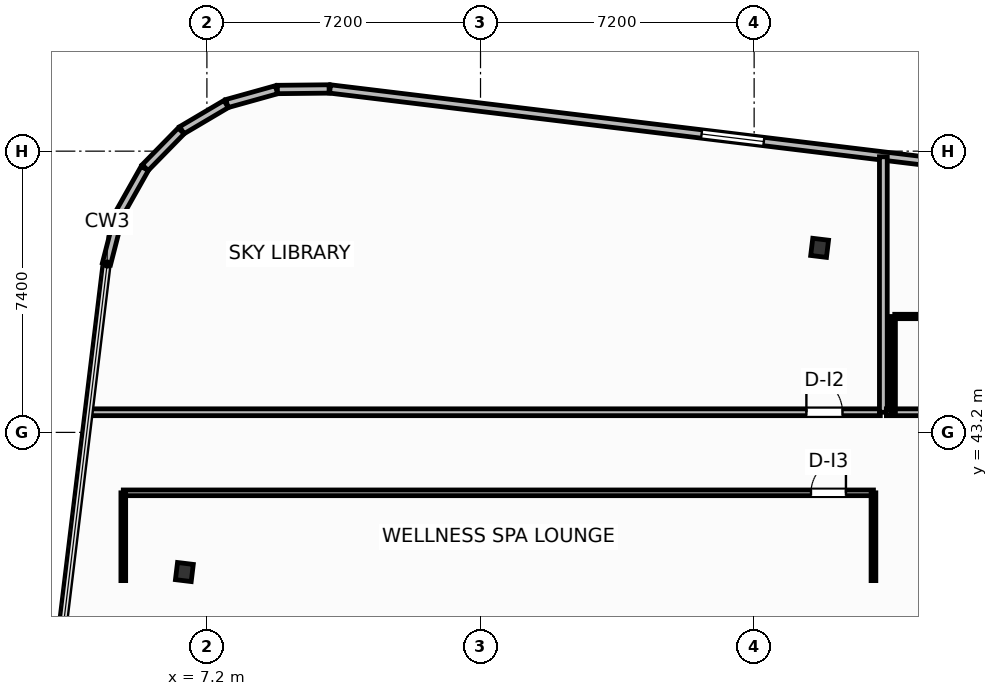
"""IFC4 building model, lengths in metres.
Left out: names, types, materials, properties, quantities, classifications, styles, units other than length and angle.
Written with IfcOpenShell. Run it as: python <this file> out.ifc"""

import sys

from ifc_helpers import new_model, si_unit, direction, frame, frame_2d, origin, origin_2d, place, context, subcontext, project, spatial, rectangle, i_section, extrude, element, fill, save


model = new_model("IFC4")
c1 = context("Model", 3, precision=1e-05, world=origin(), true_north=direction((0.0, 1.0)))
c2 = subcontext(c1, "Body", "Model", "MODEL_VIEW")
j1 = project(units=[si_unit("LENGTHUNIT", "METRE"), si_unit("PLANEANGLEUNIT", "RADIAN")], contexts=[c1])
p1 = place(None, origin())
s1 = spatial("IfcSite", under=j1, at=p1, CompositionType="ELEMENT")
p2 = place(p1, origin())
s2 = spatial("IfcBuilding", under=s1, at=p2, CompositionType="ELEMENT")
p3 = place(p2, frame((0.0, 0.0, 151.3)))
s3 = spatial("IfcBuildingStorey", under=s2, at=p3, CompositionType="ELEMENT", Elevation=151.3)
for number, where, z_axis, x_axis in (
    (1, (23.323, 48.056, 0.0), (0.0, 0.0, 1.0), (0.993, -0.12, 0.0)),
    (2, (6.607, 39.526, 0.0), (0.0, 0.0, 1.0), (0.993, -0.12, 0.0)),
):
    element("IfcColumn", number, at=place(p3, frame(where, z_axis=z_axis, x_axis=x_axis)), inside=s3, PredefinedType="COLUMN", context=c2, shape_type="SweptSolid", body=[
        extrude(i_section(OverallWidth=0.418, OverallDepth=0.455, WebThickness=0.042, FlangeThickness=0.068, FilletRadius=0.025, at=origin_2d()), origin(), (0.0, 0.0, 1.0), 3.7),
    ])
p4 = place(p3, frame((31.633, 49.668, 0.0), z_axis=(0.0, 0.0, 1.0), x_axis=(-0.992731670483, 0.120348786531, 0.0)))
e3 = element("IfcWall", 3, at=p4, inside=s3, PredefinedType="SOLIDWALL", context=c2, shape_type="SweptSolid", body=[
    extrude(rectangle(XDim=21.347, YDim=0.22, at=frame_2d((10.674, 0.0))), origin(), (0.0, 0.0, 1.0), 2.73),
])
p5 = place(p4, frame((9.849, 0.0, 0.8)))
e4 = element("IfcOpeningElement", 4, at=p5, cuts=e3, PredefinedType="OPENING", context=c2, shape_type="SweptSolid", body=[
    extrude(rectangle(XDim=1.65, YDim=1.65, at=frame_2d((0.825, 0.825))), frame((0.0, 0.12, 0.0), z_axis=(0.0, -1.0, 0.0), x_axis=(1.0, 0.0, 0.0)), (0.0, 0.0, 1.0), 0.24),
])
p6 = place(p3, frame((10.416, 52.237, 0.0), z_axis=(0.0, 0.0, 1.0), x_axis=(-0.999947718056, -0.010225514878, 0.0)))
e5 = element("IfcWall", 5, at=p6, inside=s3, PredefinedType="SOLIDWALL", context=c2, shape_type="SweptSolid", body=[
    extrude(rectangle(XDim=1.361, YDim=0.22, at=frame_2d((0.68, 0.0))), origin(), (0.0, 0.0, 1.0), 2.73),
])
for number, where, z_axis, x_axis in (
    (6, (9.031, 52.216, 0.0), (0.0, 0.0, 1.0), (-0.963, -0.269, 0.0)),
    (7, (7.706, 51.84, 0.0), (0.0, 0.0, 1.0), (-0.861, -0.509, 0.0)),
):
    element("IfcWall", number, at=place(p3, frame(where, z_axis=z_axis, x_axis=x_axis)), inside=s3, PredefinedType="SOLIDWALL", context=c2, shape_type="SweptSolid", body=[
        extrude(rectangle(XDim=1.353, YDim=0.22, at=frame_2d((0.677, 0.0))), origin(), (0.0, 0.0, 1.0), 2.73),
    ])
p7 = place(p3, frame((6.523, 51.133, 0.0), z_axis=(0.0, 0.0, 1.0), x_axis=(-0.699762925925, -0.714375144795, 0.0)))
e8 = element("IfcWall", 8, at=p7, inside=s3, PredefinedType="SOLIDWALL", context=c2, shape_type="SweptSolid", body=[
    extrude(rectangle(XDim=1.353, YDim=0.22, at=frame_2d((0.677, 0.0))), origin(), (0.0, 0.0, 1.0), 2.73),
])
p8 = place(p3, frame((5.564, 50.145, 0.0), z_axis=(0.0, 0.0, 1.0), x_axis=(-0.491117621399, -0.871093268227, 0.0)))
e9 = element("IfcWall", 9, at=p8, inside=s3, PredefinedType="SOLIDWALL", context=c2, shape_type="SweptSolid", body=[
    extrude(rectangle(XDim=1.353, YDim=0.22, at=frame_2d((0.677, 0.0))), origin(), (0.0, 0.0, 1.0), 2.73),
])
p9 = place(p3, frame((4.894, 48.942, 0.0), z_axis=(0.0, 0.0, 1.0), x_axis=(-0.248857256909, -0.968540172468, 0.0)))
e10 = element("IfcWall", 10, at=p9, inside=s3, PredefinedType="SOLIDWALL", context=c2, shape_type="SweptSolid", body=[
    extrude(rectangle(XDim=1.353, YDim=0.22, at=frame_2d((0.676, 0.0))), origin(), (0.0, 0.0, 1.0), 2.73),
])
p10 = place(p3, frame((5.0, 41.61, 0.0), z_axis=(0.0, 0.0, 1.0), x_axis=(1.0, 0.0, 0.0)))
e11 = element("IfcWall", 11, at=p10, inside=s3, PredefinedType="PARTITIONING", context=c2, shape_type="SweptSolid", body=[
    extrude(rectangle(XDim=19.74, YDim=0.15, at=frame_2d((9.87, 0.0))), origin(), (0.0, 0.0, 1.0), 3.45),
])
p11 = place(p10, frame((18.096, 0.0, 0.0)))
e12 = element("IfcOpeningElement", 12, at=p11, cuts=e11, PredefinedType="OPENING", context=c2, shape_type="SweptSolid", body=[
    extrude(rectangle(XDim=0.92, YDim=2.05, at=frame_2d((0.46, 1.025))), frame((0.0, 0.085, 0.0), z_axis=(0.0, -1.0, 0.0), x_axis=(1.0, 0.0, 0.0)), (0.0, 0.0, 1.0), 0.17),
])
for number, where, z_axis, x_axis in (
    (13, (5.0, 39.3, 0.0), (0.0, 0.0, 1.0), (0.0, 1.0, 0.0)),
    (14, (24.74, 39.3, 0.0), (0.0, 0.0, 1.0), (0.0, 1.0, 0.0)),
):
    element("IfcWall", number, at=place(p3, frame(where, z_axis=z_axis, x_axis=x_axis)), inside=s3, PredefinedType="PARTITIONING", context=c2, shape_type="SweptSolid", body=[
        extrude(rectangle(XDim=2.31, YDim=0.125, at=frame_2d((1.155, 0.0))), origin(), (0.0, 0.0, 1.0), 3.45),
    ])
p12 = place(p3, frame((4.143, 43.73, 0.0), z_axis=(0.0, 0.0, 1.0), x_axis=(1.0, 0.0, 0.0)))
e15 = element("IfcWall", 15, at=p12, inside=s3, PredefinedType="PARTITIONING", context=c2, shape_type="SweptSolid", body=[
    extrude(rectangle(XDim=20.777, YDim=0.18, at=frame_2d((10.389, 0.0))), origin(), (0.0, 0.0, 1.0), 3.45),
])
p13 = place(p12, frame((18.832, 0.0, 0.0)))
e16 = element("IfcOpeningElement", 16, at=p13, cuts=e15, PredefinedType="OPENING", context=c2, shape_type="SweptSolid", body=[
    extrude(rectangle(XDim=0.95, YDim=2.05, at=frame_2d((0.475, 1.025))), frame((0.0, 0.1, 0.0), z_axis=(0.0, -1.0, 0.0), x_axis=(1.0, 0.0, 0.0)), (0.0, 0.0, 1.0), 0.2),
])
p14 = place(p3, frame((25.0, 43.73, 0.0), z_axis=(0.0, 0.0, 1.0), x_axis=(0.0, 1.0, 0.0)))
e17 = element("IfcWall", 17, at=p14, inside=s3, PredefinedType="PARTITIONING", context=c2, shape_type="SweptSolid", body=[
    extrude(rectangle(XDim=6.722, YDim=0.205, at=frame_2d((3.361, 0.0))), origin(), (0.0, 0.0, 1.0), 3.45),
])
p15 = place(p3, frame((25.08, 43.73, 0.0), z_axis=(0.0, 0.0, 1.0), x_axis=(1.0, 0.0, 0.0)))
e18 = element("IfcWall", 18, at=p15, inside=s3, PredefinedType="PARTITIONING", context=c2, shape_type="SweptSolid", body=[
    extrude(rectangle(XDim=14.04, YDim=0.18, at=frame_2d((7.02, 0.0))), origin(), (0.0, 0.0, 1.0), 2.972),
])
p16 = place(p15, frame((3.23, 0.0, 0.0)))
e19 = element("IfcOpeningElement", 19, at=p16, cuts=e18, PredefinedType="OPENING", context=c2, shape_type="SweptSolid", body=[
    extrude(rectangle(XDim=0.95, YDim=2.15, at=frame_2d((0.475, 1.075))), frame((0.0, 0.1, 0.0), z_axis=(0.0, -1.0, 0.0), x_axis=(1.0, 0.0, 0.0)), (0.0, 0.0, 1.0), 0.2),
])
p17 = place(p3, frame((25.3, 46.25, 0.0), z_axis=(0.0, 0.0, 1.0), x_axis=(1.0, 0.0, 0.0)))
e20 = element("IfcWall", 20, at=p17, inside=s3, PredefinedType="PARTITIONING", context=c2, shape_type="SweptSolid", body=[
    extrude(rectangle(XDim=2.15, YDim=0.115, at=frame_2d((1.075, 0.0))), origin(), (0.0, 0.0, 1.0), 3.45),
])
p18 = place(p3, frame((25.26, 43.73, 0.0), z_axis=(0.0, 0.0, 1.0), x_axis=(0.0, 1.0, 0.0)))
e21 = element("IfcWall", 21, at=p18, inside=s3, PredefinedType="PARTITIONING", context=c2, shape_type="SweptSolid", body=[
    extrude(rectangle(XDim=2.52, YDim=0.115, at=frame_2d((1.26, 0.0))), origin(), (0.0, 0.0, 1.0), 3.45),
])
p19 = place(p5, origin())
e22 = element("IfcWindow", 22, at=p19, inside=s3, PartitioningType="SINGLE_PANEL", PredefinedType="WINDOW", context=c2, shape_type="SweptSolid", body=[
    extrude(rectangle(XDim=1.65, YDim=1.65, at=frame_2d((0.825, 0.825))), frame((0.0, 0.03, 0.0), z_axis=(0.0, -1.0, 0.0), x_axis=(1.0, 0.0, 0.0)), (0.0, 0.0, 1.0), 0.06),
])
fill(e4, e22)
p20 = place(p11, origin())
e23 = element("IfcDoor", 23, at=p20, inside=s3, OperationType="SINGLE_SWING_RIGHT", PredefinedType="DOOR", context=c2, shape_type="SweptSolid", body=[
    extrude(rectangle(XDim=0.92, YDim=2.05, at=frame_2d((0.46, 1.025))), frame((0.0, 0.025, 0.0), z_axis=(0.0, -1.0, 0.0), x_axis=(1.0, 0.0, 0.0)), (0.0, 0.0, 1.0), 0.05),
])
fill(e12, e23)
p21 = place(p13, origin())
e24 = element("IfcDoor", 24, at=p21, inside=s3, OperationType="SINGLE_SWING_LEFT", PredefinedType="DOOR", context=c2, shape_type="SweptSolid", body=[
    extrude(rectangle(XDim=0.95, YDim=2.05, at=frame_2d((0.475, 1.025))), frame((0.0, 0.025, 0.0), z_axis=(0.0, -1.0, 0.0), x_axis=(1.0, 0.0, 0.0)), (0.0, 0.0, 1.0), 0.05),
])
fill(e16, e24)
save(model, sys.argv[1])
